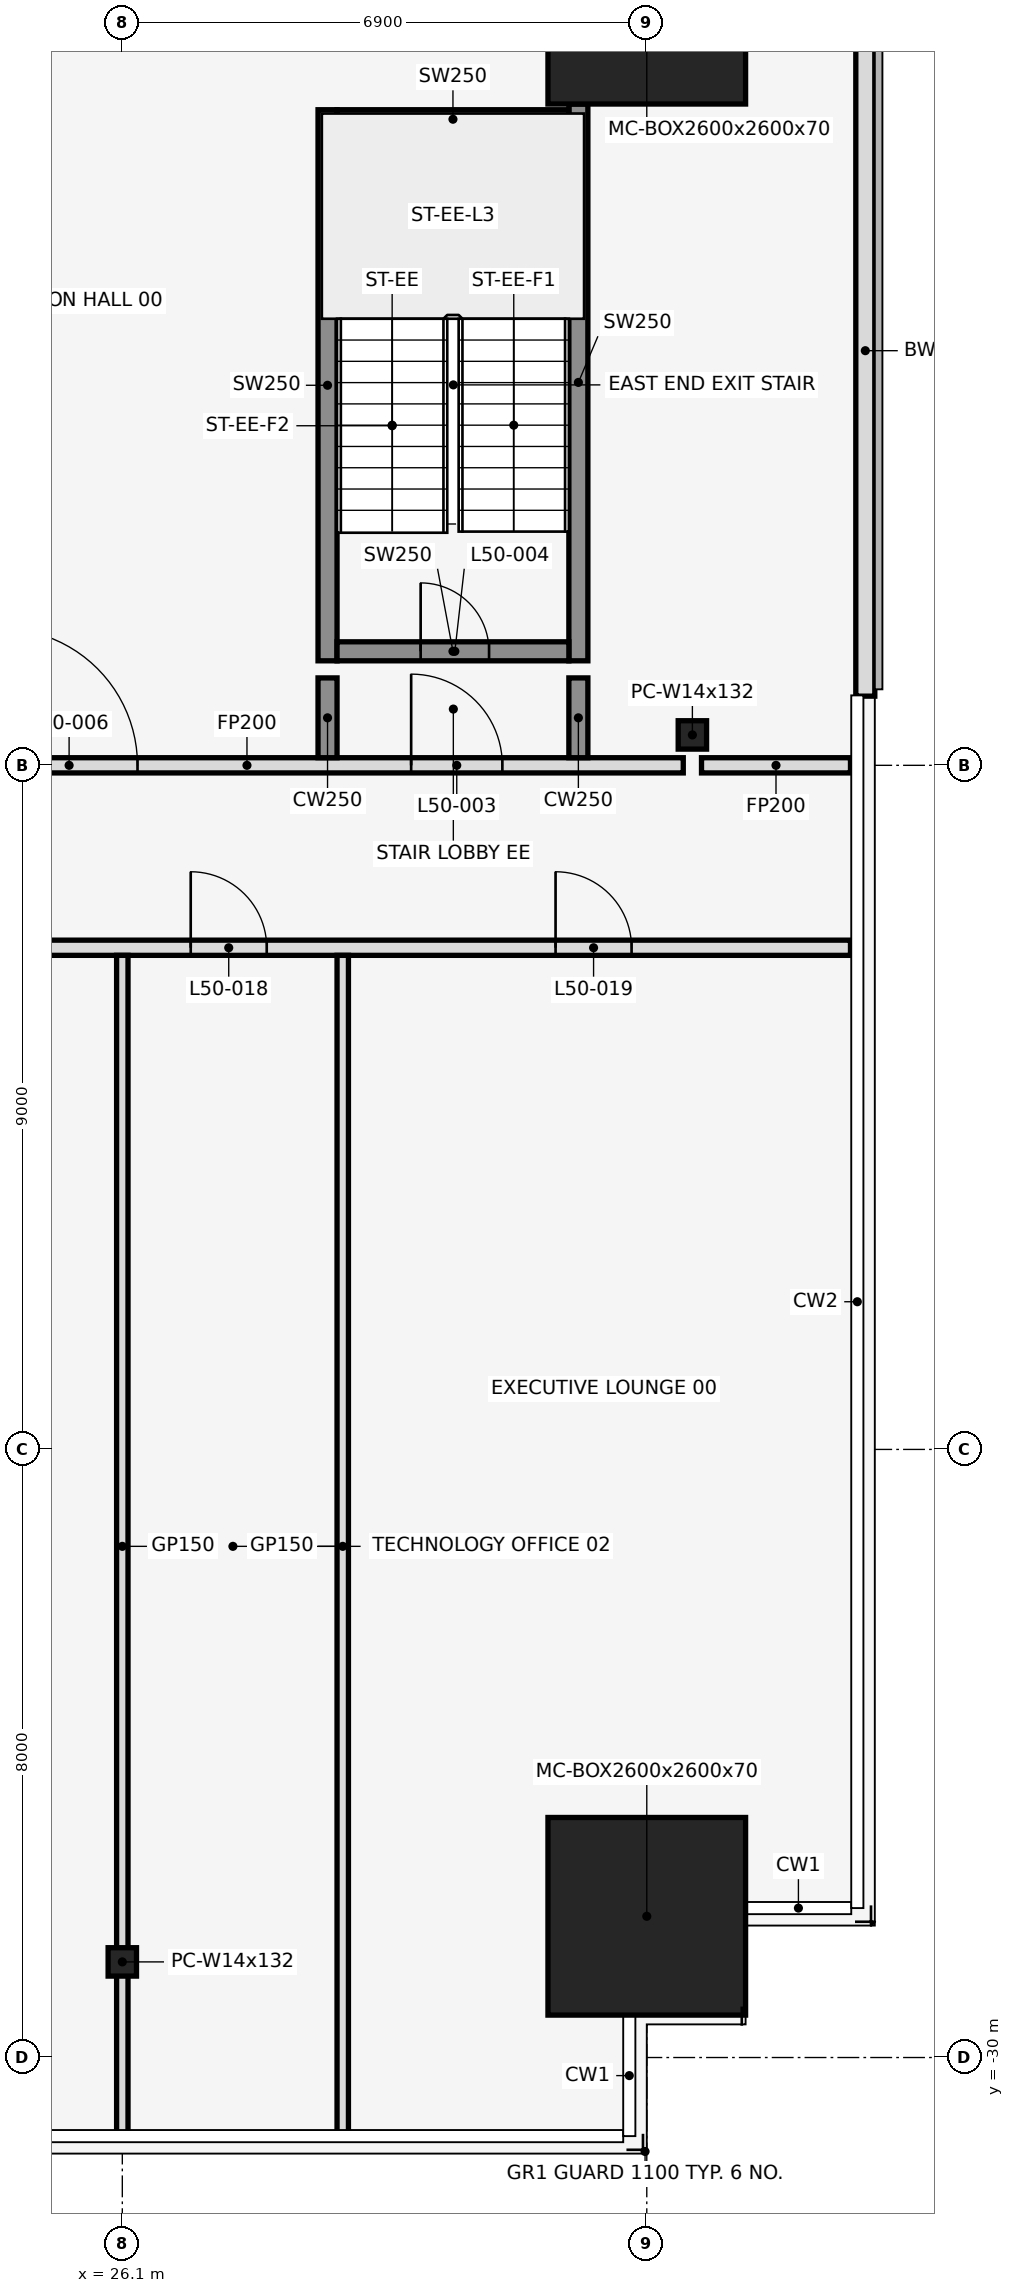
"""IFC4 building model, lengths in metres.
Left out: names, types, materials, properties, quantities, classifications, styles, units other than length and angle.
Written with IfcOpenShell. Run it as: python <this file> out.ifc"""

import sys

from ifc_helpers import new_model, si_unit, direction, frame, frame_2d, origin, origin_2d, place, context, subcontext, project, spatial, rectangle, hollow_rectangle, i_section, extrude, element, fill, save


model = new_model("IFC4")
c1 = context("Model", 3, precision=1e-05, world=origin(), true_north=direction((0.0, 1.0)))
c2 = subcontext(c1, "Body", "Model", "MODEL_VIEW")
j1 = project(units=[si_unit("LENGTHUNIT", "METRE"), si_unit("PLANEANGLEUNIT", "RADIAN")], contexts=[c1])
p1 = place(None, origin())
s1 = spatial("IfcSite", under=j1, at=p1, CompositionType="ELEMENT")
p2 = place(p1, origin())
s2 = spatial("IfcBuilding", under=s1, at=p2, CompositionType="ELEMENT")
p3 = place(p2, frame((0.0, 0.0, 223.7)))
s3 = spatial("IfcBuildingStorey", under=s2, at=p3, CompositionType="ELEMENT", Elevation=223.7)
p4 = place(p3, frame((26.1, -28.742, 0.0), z_axis=(0.0, 0.0, 1.0), x_axis=(1.0, 0.0, 0.0)))
e1 = element("IfcColumn", 1, at=p4, inside=s3, PredefinedType="COLUMN", context=c2, shape_type="SweptSolid", body=[
    extrude(i_section(OverallWidth=0.373, OverallDepth=0.373, WebThickness=0.016, FlangeThickness=0.026, at=origin_2d()), origin(), (0.0, 0.0, 1.0), 4.1),
])
for number, where, z_axis, x_axis in (
    (2, (33.0, -28.142, 0.0), (0.0, 0.0, 1.0), (1.0, 0.0, 0.0)),
    (3, (33.0, -3.0, 0.0), (0.0, 0.0, 1.0), (1.0, 0.0, 0.0)),
):
    element("IfcColumn", number, at=place(p3, frame(where, z_axis=z_axis, x_axis=x_axis)), inside=s3, PredefinedType="COLUMN", context=c2, shape_type="SweptSolid", body=[
        extrude(hollow_rectangle(XDim=2.6, YDim=2.6, WallThickness=0.07, at=origin_2d()), origin(), (0.0, 0.0, 1.0), 4.1),
    ])
p5 = place(p3, frame((33.6, -12.6, 0.0), z_axis=(0.0, 0.0, 1.0), x_axis=(1.0, 0.0, 0.0)))
e4 = element("IfcColumn", 4, at=p5, inside=s3, PredefinedType="COLUMN", context=c2, shape_type="SweptSolid", body=[
    extrude(i_section(OverallWidth=0.373, OverallDepth=0.373, WebThickness=0.016, FlangeThickness=0.026, at=origin_2d()), origin(), (0.0, 0.0, 1.0), 4.1),
])
p6 = place(p3, frame((35.875, -12.09, 0.0), z_axis=(0.0, 0.0, 1.0), x_axis=(0.0, 1.0, 0.0)))
e5 = element("IfcWall", 5, at=p6, inside=s3, PredefinedType="STANDARD", context=c2, shape_type="SweptSolid", body=[
    extrude(rectangle(XDim=9.09, YDim=0.25, at=frame_2d((4.545, 0.0))), origin(), (0.0, 0.0, 1.0), 3.95),
])
p7 = place(p3, frame((28.8, -11.625, 0.0), z_axis=(0.0, 0.0, 1.0), x_axis=(0.0, 1.0, 0.0)))
e6 = element("IfcWall", 6, at=p7, inside=s3, PredefinedType="SHEAR", context=c2, shape_type="SweptSolid", body=[
    extrude(rectangle(XDim=7.25, YDim=0.25, at=frame_2d((3.625, 0.0))), origin(), (0.0, 0.0, 1.0), 4.1),
])
p8 = place(p3, frame((32.1, -11.625, 0.0), z_axis=(0.0, 0.0, 1.0), x_axis=(0.0, 1.0, 0.0)))
e7 = element("IfcWall", 7, at=p8, inside=s3, PredefinedType="SHEAR", context=c2, shape_type="SweptSolid", body=[
    extrude(rectangle(XDim=7.325, YDim=0.25, at=frame_2d((3.663, 0.0))), origin(), (0.0, 0.0, 1.0), 4.1),
])
p9 = place(p3, frame((28.925, -11.5, 0.0), z_axis=(0.0, 0.0, 1.0), x_axis=(1.0, 0.0, 0.0)))
e8 = element("IfcWall", 8, at=p9, inside=s3, PredefinedType="SHEAR", context=c2, shape_type="SweptSolid", body=[
    extrude(rectangle(XDim=3.05, YDim=0.25, at=frame_2d((1.525, 0.0))), origin(), (0.0, 0.0, 1.0), 4.1),
])
p10 = place(p9, frame((1.1, 0.0, 0.0)))
e9 = element("IfcOpeningElement", 9, at=p10, cuts=e8, PredefinedType="OPENING", context=c2, shape_type="SweptSolid", body=[
    extrude(rectangle(XDim=0.9, YDim=2.1, at=frame_2d((0.45, 1.05))), frame((0.0, 0.137, 0.0), z_axis=(0.0, -1.0, 0.0), x_axis=(1.0, 0.0, 0.0)), (0.0, 0.0, 1.0), 0.274),
])
p11 = place(p3, frame((28.925, -4.5, 0.0), z_axis=(0.0, 0.0, 1.0), x_axis=(1.0, 0.0, 0.0)))
e10 = element("IfcWall", 10, at=p11, inside=s3, PredefinedType="SHEAR", context=c2, shape_type="SweptSolid", body=[
    extrude(rectangle(XDim=3.05, YDim=0.25, at=frame_2d((1.525, 0.0))), origin(), (0.0, 0.0, 1.0), 4.1),
])
p12 = place(p3, frame((-35.68, -15.4, 0.0), z_axis=(0.0, 0.0, 1.0), x_axis=(1.0, 0.0, 0.0)))
e11 = element("IfcWall", 11, at=p12, inside=s3, PredefinedType="PARTITIONING", context=c2, shape_type="SweptSolid", body=[
    extrude(rectangle(XDim=71.36, YDim=0.2, at=frame_2d((35.68, 0.0))), origin(), (0.0, 0.0, 1.0), 2.84),
])
p13 = place(p12, frame((3.9, 0.0, 0.0)))
e12 = element("IfcOpeningElement", 12, at=p13, cuts=e11, PredefinedType="OPENING", context=c2, shape_type="SweptSolid", body=[
    extrude(rectangle(XDim=1.8, YDim=2.1, at=frame_2d((0.9, 1.05))), frame((0.0, 0.112, 0.0), z_axis=(0.0, -1.0, 0.0), x_axis=(1.0, 0.0, 0.0)), (0.0, 0.0, 1.0), 0.224),
])
p14 = place(p12, frame((13.48, 0.0, 0.0)))
e13 = element("IfcOpeningElement", 13, at=p14, cuts=e11, PredefinedType="OPENING", context=c2, shape_type="SweptSolid", body=[
    extrude(rectangle(XDim=0.9, YDim=2.1, at=frame_2d((0.45, 1.05))), frame((0.0, 0.112, 0.0), z_axis=(0.0, -1.0, 0.0), x_axis=(1.0, 0.0, 0.0)), (0.0, 0.0, 1.0), 0.224),
])
p15 = place(p12, frame((21.68, 0.0, 0.0)))
e14 = element("IfcOpeningElement", 14, at=p15, cuts=e11, PredefinedType="OPENING", context=c2, shape_type="SweptSolid", body=[
    extrude(rectangle(XDim=1.8, YDim=2.1, at=frame_2d((0.9, 1.05))), frame((0.0, 0.112, 0.0), z_axis=(0.0, -1.0, 0.0), x_axis=(1.0, 0.0, 0.0)), (0.0, 0.0, 1.0), 0.224),
])
p16 = place(p12, frame((29.38, 0.0, 0.0)))
e15 = element("IfcOpeningElement", 15, at=p16, cuts=e11, PredefinedType="OPENING", context=c2, shape_type="SweptSolid", body=[
    extrude(rectangle(XDim=1.0, YDim=2.1, at=frame_2d((0.5, 1.05))), frame((0.0, 0.112, 0.0), z_axis=(0.0, -1.0, 0.0), x_axis=(1.0, 0.0, 0.0)), (0.0, 0.0, 1.0), 0.224),
])
p17 = place(p12, frame((35.18, 0.0, 0.0)))
e16 = element("IfcOpeningElement", 16, at=p17, cuts=e11, PredefinedType="OPENING", context=c2, shape_type="SweptSolid", body=[
    extrude(rectangle(XDim=1.0, YDim=2.1, at=frame_2d((0.5, 1.05))), frame((0.0, 0.112, 0.0), z_axis=(0.0, -1.0, 0.0), x_axis=(1.0, 0.0, 0.0)), (0.0, 0.0, 1.0), 0.224),
])
p18 = place(p12, frame((41.98, 0.0, 0.0)))
e17 = element("IfcOpeningElement", 17, at=p18, cuts=e11, PredefinedType="OPENING", context=c2, shape_type="SweptSolid", body=[
    extrude(rectangle(XDim=1.8, YDim=2.1, at=frame_2d((0.9, 1.05))), frame((0.0, 0.112, 0.0), z_axis=(0.0, -1.0, 0.0), x_axis=(1.0, 0.0, 0.0)), (0.0, 0.0, 1.0), 0.224),
])
p19 = place(p12, frame((49.68, 0.0, 0.0)))
e18 = element("IfcOpeningElement", 18, at=p19, cuts=e11, PredefinedType="OPENING", context=c2, shape_type="SweptSolid", body=[
    extrude(rectangle(XDim=1.0, YDim=2.1, at=frame_2d((0.5, 1.05))), frame((0.0, 0.112, 0.0), z_axis=(0.0, -1.0, 0.0), x_axis=(1.0, 0.0, 0.0)), (0.0, 0.0, 1.0), 0.224),
])
p20 = place(p12, frame((56.98, 0.0, 0.0)))
e19 = element("IfcOpeningElement", 19, at=p20, cuts=e11, PredefinedType="OPENING", context=c2, shape_type="SweptSolid", body=[
    extrude(rectangle(XDim=1.0, YDim=2.1, at=frame_2d((0.5, 1.05))), frame((0.0, 0.112, 0.0), z_axis=(0.0, -1.0, 0.0), x_axis=(1.0, 0.0, 0.0)), (0.0, 0.0, 1.0), 0.224),
])
p21 = place(p12, frame((62.68, 0.0, 0.0)))
e20 = element("IfcOpeningElement", 20, at=p21, cuts=e11, PredefinedType="OPENING", context=c2, shape_type="SweptSolid", body=[
    extrude(rectangle(XDim=1.0, YDim=2.1, at=frame_2d((0.5, 1.05))), frame((0.0, 0.112, 0.0), z_axis=(0.0, -1.0, 0.0), x_axis=(1.0, 0.0, 0.0)), (0.0, 0.0, 1.0), 0.224),
])
p22 = place(p12, frame((67.48, 0.0, 0.0)))
e21 = element("IfcOpeningElement", 21, at=p22, cuts=e11, PredefinedType="OPENING", context=c2, shape_type="SweptSolid", body=[
    extrude(rectangle(XDim=1.0, YDim=2.1, at=frame_2d((0.5, 1.05))), frame((0.0, 0.112, 0.0), z_axis=(0.0, -1.0, 0.0), x_axis=(1.0, 0.0, 0.0)), (0.0, 0.0, 1.0), 0.224),
])
p23 = place(p3, frame((22.0, -13.0, 0.0), z_axis=(0.0, 0.0, 1.0), x_axis=(1.0, 0.0, 0.0)))
e22 = element("IfcWall", 22, at=p23, inside=s3, PredefinedType="PARTITIONING", context=c2, shape_type="SweptSolid", body=[
    extrude(rectangle(XDim=11.48, YDim=0.2, at=frame_2d((5.74, 0.0))), origin(), (0.0, 0.0, 1.0), 2.84),
])
p24 = place(p23, frame((7.9, 0.0, 0.0)))
e23 = element("IfcOpeningElement", 23, at=p24, cuts=e22, PredefinedType="OPENING", context=c2, shape_type="SweptSolid", body=[
    extrude(rectangle(XDim=1.2, YDim=2.1, at=frame_2d((0.6, 1.05))), frame((0.0, 0.112, 0.0), z_axis=(0.0, -1.0, 0.0), x_axis=(1.0, 0.0, 0.0)), (0.0, 0.0, 1.0), 0.224),
])
p25 = place(p23, frame((2.5, 0.0, 0.0)))
e24 = element("IfcOpeningElement", 24, at=p25, cuts=e22, PredefinedType="OPENING", context=c2, shape_type="SweptSolid", body=[
    extrude(rectangle(XDim=1.8, YDim=2.1, at=frame_2d((0.9, 1.05))), frame((0.0, 0.112, 0.0), z_axis=(0.0, -1.0, 0.0), x_axis=(1.0, 0.0, 0.0)), (0.0, 0.0, 1.0), 0.224),
])
p26 = place(p3, frame((33.72, -13.0, 0.0), z_axis=(0.0, 0.0, 1.0), x_axis=(1.0, 0.0, 0.0)))
e25 = element("IfcWall", 25, at=p26, inside=s3, PredefinedType="PARTITIONING", context=c2, shape_type="SweptSolid", body=[
    extrude(rectangle(XDim=1.96, YDim=0.2, at=frame_2d((0.98, 0.0))), origin(), (0.0, 0.0, 1.0), 2.84),
])
p27 = place(p3, frame((26.1, -31.05, 0.0), z_axis=(0.0, 0.0, 1.0), x_axis=(0.0, 1.0, 0.0)))
e26 = element("IfcWall", 26, at=p27, inside=s3, PredefinedType="PARTITIONING", context=c2, shape_type="SweptSolid", body=[
    extrude(rectangle(XDim=15.55, YDim=0.15, at=frame_2d((7.775, 0.0))), origin(), (0.0, 0.0, 1.0), 2.84),
])
p28 = place(p3, frame((28.8, -12.9, 0.0), z_axis=(0.0, 0.0, 1.0), x_axis=(0.0, 1.0, 0.0)))
e27 = element("IfcWall", 27, at=p28, inside=s3, PredefinedType="SHEAR", context=c2, shape_type="SweptSolid", body=[
    extrude(rectangle(XDim=1.05, YDim=0.25, at=frame_2d((0.525, 0.0))), origin(), (0.0, 0.0, 1.0), 4.1),
])
p29 = place(p3, frame((29.0, -31.05, 0.0), z_axis=(0.0, 0.0, 1.0), x_axis=(0.0, 1.0, 0.0)))
e28 = element("IfcWall", 28, at=p29, inside=s3, PredefinedType="PARTITIONING", context=c2, shape_type="SweptSolid", body=[
    extrude(rectangle(XDim=15.55, YDim=0.15, at=frame_2d((7.775, 0.0))), origin(), (0.0, 0.0, 1.0), 2.84),
])
p30 = place(p3, frame((32.1, -12.9, 0.0), z_axis=(0.0, 0.0, 1.0), x_axis=(0.0, 1.0, 0.0)))
e29 = element("IfcWall", 29, at=p30, inside=s3, PredefinedType="SHEAR", context=c2, shape_type="SweptSolid", body=[
    extrude(rectangle(XDim=1.05, YDim=0.25, at=frame_2d((0.525, 0.0))), origin(), (0.0, 0.0, 1.0), 4.1),
])
p31 = place(p24, origin())
e30 = element("IfcDoor", 30, at=p31, inside=s3, OperationType="SINGLE_SWING_RIGHT", PredefinedType="DOOR", context=c2, shape_type="SweptSolid", body=[
    extrude(rectangle(XDim=1.2, YDim=2.1, at=frame_2d((0.6, 1.05))), frame((0.0, 0.025, 0.0), z_axis=(0.0, -1.0, 0.0), x_axis=(1.0, 0.0, 0.0)), (0.0, 0.0, 1.0), 0.05),
])
fill(e23, e30)
p32 = place(p10, origin())
e31 = element("IfcDoor", 31, at=p32, inside=s3, OperationType="SINGLE_SWING_LEFT", PredefinedType="DOOR", context=c2, shape_type="SweptSolid", body=[
    extrude(rectangle(XDim=0.9, YDim=2.1, at=frame_2d((0.45, 1.05))), frame((0.0, 0.025, 0.0), z_axis=(0.0, -1.0, 0.0), x_axis=(1.0, 0.0, 0.0)), (0.0, 0.0, 1.0), 0.05),
])
fill(e9, e31)
p33 = place(p25, origin())
e32 = element("IfcDoor", 32, at=p33, inside=s3, OperationType="SINGLE_SWING_LEFT", PredefinedType="DOOR", context=c2, shape_type="SweptSolid", body=[
    extrude(rectangle(XDim=1.8, YDim=2.1, at=frame_2d((0.9, 1.05))), frame((0.0, 0.025, 0.0), z_axis=(0.0, -1.0, 0.0), x_axis=(1.0, 0.0, 0.0)), (0.0, 0.0, 1.0), 0.05),
])
fill(e24, e32)
p34 = place(p21, frame((1.0, 0.0, 0.0), z_axis=(0.0, 0.0, 1.0), x_axis=(-1.0, 0.0, 0.0)))
e33 = element("IfcDoor", 33, at=p34, inside=s3, OperationType="SINGLE_SWING_RIGHT", PredefinedType="DOOR", context=c2, shape_type="SweptSolid", body=[
    extrude(rectangle(XDim=1.0, YDim=2.1, at=frame_2d((0.5, 1.05))), frame((0.0, 0.025, 0.0), z_axis=(0.0, -1.0, 0.0), x_axis=(1.0, 0.0, 0.0)), (0.0, 0.0, 1.0), 0.05),
])
fill(e20, e33)
p35 = place(p22, frame((1.0, 0.0, 0.0), z_axis=(0.0, 0.0, 1.0), x_axis=(-1.0, 0.0, 0.0)))
e34 = element("IfcDoor", 34, at=p35, inside=s3, OperationType="SINGLE_SWING_LEFT", PredefinedType="DOOR", context=c2, shape_type="SweptSolid", body=[
    extrude(rectangle(XDim=1.0, YDim=2.1, at=frame_2d((0.5, 1.05))), frame((0.0, 0.025, 0.0), z_axis=(0.0, -1.0, 0.0), x_axis=(1.0, 0.0, 0.0)), (0.0, 0.0, 1.0), 0.05),
])
fill(e21, e34)
save(model, sys.argv[1])
